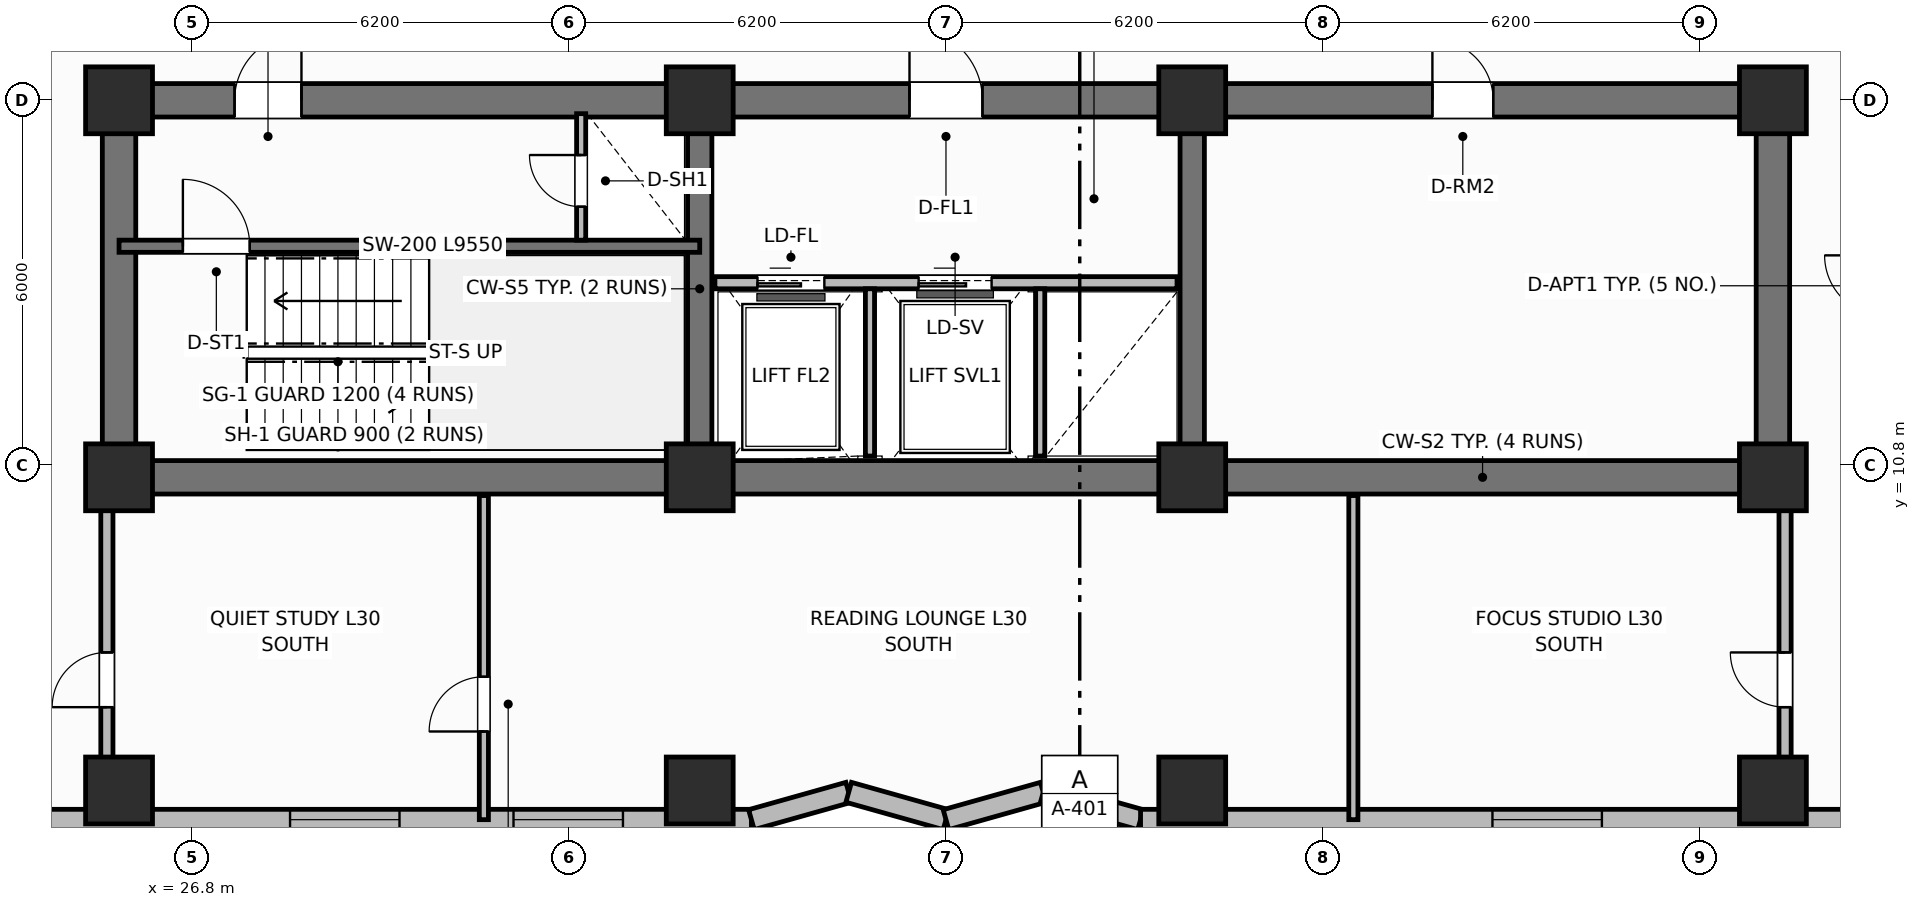
"""IFC4 building model, lengths in metres.
Left out: names, types, materials, properties, quantities, classifications, styles, units other than length and angle.
Written with IfcOpenShell. Run it as: python <this file> out.ifc"""

import sys

from ifc_helpers import new_model, si_unit, direction, frame, frame_2d, origin, origin_2d, place, context, subcontext, project, spatial, rectangle, extrude, element, fill, save


model = new_model("IFC4")
c1 = context("Model", 3, precision=1e-05, world=origin(), true_north=direction((0.0, 1.0)))
c2 = subcontext(c1, "Body", "Model", "MODEL_VIEW")
j1 = project(units=[si_unit("LENGTHUNIT", "METRE"), si_unit("PLANEANGLEUNIT", "RADIAN")], contexts=[c1])
p1 = place(None, origin())
s1 = spatial("IfcSite", under=j1, at=p1, CompositionType="ELEMENT")
p2 = place(p1, origin())
s2 = spatial("IfcBuilding", under=s1, at=p2, CompositionType="ELEMENT")
p3 = place(p2, frame((0.0, 0.0, 121.6)))
s3 = spatial("IfcBuildingStorey", under=s2, at=p3, CompositionType="ELEMENT", Elevation=121.6)
p4 = place(p3, frame((52.8, 10.6, 0.0), z_axis=(0.0, 0.0, 1.0), x_axis=(-1.0, 0.0, 0.0)))
e1 = element("IfcWall", 1, at=p4, inside=s3, PredefinedType="SHEAR", context=c2, shape_type="SweptSolid", body=[
    extrude(rectangle(XDim=27.2, YDim=0.55, at=frame_2d((13.6, 0.0))), origin(), (0.0, 0.0, 1.0), 3.7),
])
for number, where, z_axis, x_axis in (
    (2, (25.6, 10.875, 0.0), (0.0, 0.0, 1.0), (0.0, 1.0, 0.0)),
    (3, (52.8, 10.875, 0.0), (0.0, 0.0, 1.0), (0.0, 1.0, 0.0)),
):
    element("IfcWall", number, at=place(p3, frame(where, z_axis=z_axis, x_axis=x_axis)), inside=s3, PredefinedType="SHEAR", context=c2, shape_type="SweptSolid", body=[
        extrude(rectangle(XDim=5.65, YDim=0.55, at=frame_2d((2.825, 0.0))), origin(), (0.0, 0.0, 1.0), 3.7),
    ])
p5 = place(p3, frame((25.6, 16.8, 0.0), z_axis=(0.0, 0.0, 1.0), x_axis=(1.0, 0.0, 0.0)))
e4 = element("IfcWall", 4, at=p5, inside=s3, PredefinedType="SHEAR", context=c2, shape_type="SweptSolid", body=[
    extrude(rectangle(XDim=27.2, YDim=0.55, at=frame_2d((13.6, 0.0))), origin(), (0.0, 0.0, 1.0), 3.7),
])
p6 = place(p5, frame((1.9, 0.0, 0.0)))
e5 = element("IfcOpeningElement", 5, at=p6, cuts=e4, PredefinedType="OPENING", context=c2, shape_type="SweptSolid", body=[
    extrude(rectangle(XDim=1.1, YDim=2.15, at=frame_2d((0.55, 1.075))), frame((0.0, 0.285, 0.0), z_axis=(0.0, -1.0, 0.0), x_axis=(1.0, 0.0, 0.0)), (0.0, 0.0, 1.0), 0.57),
])
p7 = place(p5, frame((13.0, 0.0, 0.0)))
e6 = element("IfcOpeningElement", 6, at=p7, cuts=e4, PredefinedType="OPENING", context=c2, shape_type="SweptSolid", body=[
    extrude(rectangle(XDim=1.2, YDim=2.15, at=frame_2d((0.6, 1.075))), frame((0.0, 0.285, 0.0), z_axis=(0.0, -1.0, 0.0), x_axis=(1.0, 0.0, 0.0)), (0.0, 0.0, 1.0), 0.57),
])
p8 = place(p5, frame((21.6, 0.0, 0.0)))
e7 = element("IfcOpeningElement", 7, at=p8, cuts=e4, PredefinedType="OPENING", context=c2, shape_type="SweptSolid", body=[
    extrude(rectangle(XDim=1.0, YDim=2.15, at=frame_2d((0.5, 1.075))), frame((0.0, 0.285, 0.0), z_axis=(0.0, -1.0, 0.0), x_axis=(1.0, 0.0, 0.0)), (0.0, 0.0, 1.0), 0.57),
])
for number, where, z_axis, x_axis in (
    (8, (35.15, 10.875, 0.0), (0.0, 0.0, 1.0), (0.0, 1.0, 0.0)),
    (9, (43.25, 10.875, 0.0), (0.0, 0.0, 1.0), (0.0, 1.0, 0.0)),
):
    element("IfcWall", number, at=place(p3, frame(where, z_axis=z_axis, x_axis=x_axis)), inside=s3, PredefinedType="SHEAR", context=c2, shape_type="SweptSolid", body=[
        extrude(rectangle(XDim=5.65, YDim=0.4, at=frame_2d((2.825, 0.0))), origin(), (0.0, 0.0, 1.0), 3.7),
    ])
for number, where, z_axis, x_axis in (
    (10, (25.6, 10.6, 0.0), (0.0, 0.0, 1.0), (1.0, 0.0, 0.0)),
    (11, (25.6, 16.8, 0.0), (0.0, 0.0, 1.0), (1.0, 0.0, 0.0)),
    (12, (35.15, 10.6, 0.0), (0.0, 0.0, 1.0), (1.0, 0.0, 0.0)),
    (13, (35.15, 16.8, 0.0), (0.0, 0.0, 1.0), (1.0, 0.0, 0.0)),
    (14, (43.25, 10.6, 0.0), (0.0, 0.0, 1.0), (1.0, 0.0, 0.0)),
    (15, (43.25, 16.8, 0.0), (0.0, 0.0, 1.0), (1.0, 0.0, 0.0)),
    (16, (52.8, 10.6, 0.0), (0.0, 0.0, 1.0), (1.0, 0.0, 0.0)),
    (17, (52.8, 16.8, 0.0), (0.0, 0.0, 1.0), (1.0, 0.0, 0.0)),
    (18, (25.6, 5.45, 0.0), (0.0, 0.0, 1.0), (1.0, 0.0, 0.0)),
    (19, (35.15, 5.45, 0.0), (0.0, 0.0, 1.0), (1.0, 0.0, 0.0)),
    (20, (43.25, 5.45, 0.0), (0.0, 0.0, 1.0), (1.0, 0.0, 0.0)),
    (21, (52.8, 5.45, 0.0), (0.0, 0.0, 1.0), (1.0, 0.0, 0.0)),
):
    element("IfcColumn", number, at=place(p3, frame(where, z_axis=z_axis, x_axis=x_axis)), inside=s3, PredefinedType="COLUMN", context=c2, shape_type="SweptSolid", body=[
        extrude(rectangle(XDim=1.1, YDim=1.1, at=origin_2d()), origin(), (0.0, 0.0, 1.0), 3.7),
    ])
p9 = place(p3, frame((18.6, 4.97, 0.0), z_axis=(0.0, 0.0, 1.0), x_axis=(1.0, 0.0, 0.0)))
e22 = element("IfcWall", 22, at=p9, inside=s3, PredefinedType="SOLIDWALL", context=c2, shape_type="SweptSolid", body=[
    extrude(rectangle(XDim=17.4, YDim=0.34, at=frame_2d((8.7, 0.0))), origin(), (0.0, 0.0, 1.0), 2.7),
])
p10 = place(p9, frame((1.762, 0.0, 0.73)))
e23 = element("IfcOpeningElement", 23, at=p10, cuts=e22, PredefinedType="OPENING", context=c2, shape_type="SweptSolid", body=[
    extrude(rectangle(XDim=1.8, YDim=1.85, at=frame_2d((0.9, 0.925))), frame((0.0, 0.18, 0.0), z_axis=(0.0, -1.0, 0.0), x_axis=(1.0, 0.0, 0.0)), (0.0, 0.0, 1.0), 0.36),
])
p11 = place(p9, frame((9.812, 0.0, 0.73)))
e24 = element("IfcOpeningElement", 24, at=p11, cuts=e22, PredefinedType="OPENING", context=c2, shape_type="SweptSolid", body=[
    extrude(rectangle(XDim=1.8, YDim=1.85, at=frame_2d((0.9, 0.925))), frame((0.0, 0.18, 0.0), z_axis=(0.0, -1.0, 0.0), x_axis=(1.0, 0.0, 0.0)), (0.0, 0.0, 1.0), 0.36),
])
p12 = place(p9, frame((13.488, 0.0, 0.73)))
e25 = element("IfcOpeningElement", 25, at=p12, cuts=e22, PredefinedType="OPENING", context=c2, shape_type="SweptSolid", body=[
    extrude(rectangle(XDim=1.8, YDim=1.85, at=frame_2d((0.9, 0.925))), frame((0.0, 0.18, 0.0), z_axis=(0.0, -1.0, 0.0), x_axis=(1.0, 0.0, 0.0)), (0.0, 0.0, 1.0), 0.36),
])
p13 = place(p3, frame((36.0, 4.97, 0.0), z_axis=(0.0, 0.0, 1.0), x_axis=(0.962662902433, 0.270703040766, 0.0)))
e26 = element("IfcWall", 26, at=p13, inside=s3, PredefinedType="SOLIDWALL", context=c2, shape_type="SweptSolid", body=[
    extrude(rectangle(XDim=1.662, YDim=0.34, at=frame_2d((0.831, 0.0))), origin(), (0.0, 0.0, 1.0), 2.7),
])
p14 = place(p3, frame((37.6, 5.42, 0.0), z_axis=(0.0, 0.0, 1.0), x_axis=(0.962652136636, -0.270741322725, 0.0)))
e27 = element("IfcWall", 27, at=p14, inside=s3, PredefinedType="SOLIDWALL", context=c2, shape_type="SweptSolid", body=[
    extrude(rectangle(XDim=1.662, YDim=0.34, at=frame_2d((0.831, 0.0))), origin(), (0.0, 0.0, 1.0), 2.7),
])
p15 = place(p3, frame((39.2, 4.97, 0.0), z_axis=(0.0, 0.0, 1.0), x_axis=(0.962662902433, 0.270703040766, 0.0)))
e28 = element("IfcWall", 28, at=p15, inside=s3, PredefinedType="SOLIDWALL", context=c2, shape_type="SweptSolid", body=[
    extrude(rectangle(XDim=1.662, YDim=0.34, at=frame_2d((0.831, 0.0))), origin(), (0.0, 0.0, 1.0), 2.7),
])
p16 = place(p3, frame((40.8, 5.42, 0.0), z_axis=(0.0, 0.0, 1.0), x_axis=(0.962652136636, -0.270741322725, 0.0)))
e29 = element("IfcWall", 29, at=p16, inside=s3, PredefinedType="SOLIDWALL", context=c2, shape_type="SweptSolid", body=[
    extrude(rectangle(XDim=1.662, YDim=0.34, at=frame_2d((0.831, 0.0))), origin(), (0.0, 0.0, 1.0), 2.7),
])
p17 = place(p3, frame((42.4, 4.97, 0.0), z_axis=(0.0, 0.0, 1.0), x_axis=(1.0, 0.0, 0.0)))
e30 = element("IfcWall", 30, at=p17, inside=s3, PredefinedType="SOLIDWALL", context=c2, shape_type="SweptSolid", body=[
    extrude(rectangle(XDim=17.4, YDim=0.34, at=frame_2d((8.7, 0.0))), origin(), (0.0, 0.0, 1.0), 2.7),
])
p18 = place(p17, frame((5.788, 0.0, 0.73)))
e31 = element("IfcOpeningElement", 31, at=p18, cuts=e30, PredefinedType="OPENING", context=c2, shape_type="SweptSolid", body=[
    extrude(rectangle(XDim=1.8, YDim=1.85, at=frame_2d((0.9, 0.925))), frame((0.0, 0.18, 0.0), z_axis=(0.0, -1.0, 0.0), x_axis=(1.0, 0.0, 0.0)), (0.0, 0.0, 1.0), 0.36),
])
p19 = place(p17, frame((13.837, 0.0, 0.73)))
e32 = element("IfcOpeningElement", 32, at=p19, cuts=e30, PredefinedType="OPENING", context=c2, shape_type="SweptSolid", body=[
    extrude(rectangle(XDim=1.8, YDim=1.85, at=frame_2d((0.9, 0.925))), frame((0.0, 0.18, 0.0), z_axis=(0.0, -1.0, 0.0), x_axis=(1.0, 0.0, 0.0)), (0.0, 0.0, 1.0), 0.36),
])
p20 = place(p3, frame((25.6, 14.4, 0.0), z_axis=(0.0, 0.0, 1.0), x_axis=(1.0, 0.0, 0.0)))
e33 = element("IfcWall", 33, at=p20, inside=s3, PredefinedType="SHEAR", context=c2, shape_type="SweptSolid", body=[
    extrude(rectangle(XDim=9.55, YDim=0.2, at=frame_2d((4.775, 0.0))), origin(), (0.0, 0.0, 1.0), 3.7),
])
p21 = place(p20, frame((1.05, 0.0, 0.0)))
e34 = element("IfcOpeningElement", 34, at=p21, cuts=e33, PredefinedType="OPENING", context=c2, shape_type="SweptSolid", body=[
    extrude(rectangle(XDim=1.1, YDim=2.15, at=frame_2d((0.55, 1.075))), frame((0.0, 0.11, 0.0), z_axis=(0.0, -1.0, 0.0), x_axis=(1.0, 0.0, 0.0)), (0.0, 0.0, 1.0), 0.22),
])
p22 = place(p3, frame((33.2, 14.5, 0.0), z_axis=(0.0, 0.0, 1.0), x_axis=(0.0, 1.0, 0.0)))
e35 = element("IfcWall", 35, at=p22, inside=s3, PredefinedType="PARTITIONING", context=c2, shape_type="SweptSolid", body=[
    extrude(rectangle(XDim=2.08, YDim=0.15, at=frame_2d((1.04, 0.0))), origin(), (0.0, 0.0, 1.0), 2.53),
])
p23 = place(p22, frame((0.55, 0.0, 0.0)))
e36 = element("IfcOpeningElement", 36, at=p23, cuts=e35, PredefinedType="OPENING", context=c2, shape_type="SweptSolid", body=[
    extrude(rectangle(XDim=0.85, YDim=2.05, at=frame_2d((0.425, 1.025))), frame((0.0, 0.085, 0.0), z_axis=(0.0, -1.0, 0.0), x_axis=(1.0, 0.0, 0.0)), (0.0, 0.0, 1.0), 0.17),
])
p24 = place(p3, frame((35.4, 13.8, 0.0), z_axis=(0.0, 0.0, 1.0), x_axis=(1.0, 0.0, 0.0)))
e37 = element("IfcWall", 37, at=p24, inside=s3, PredefinedType="PARTITIONING", context=c2, shape_type="SweptSolid", body=[
    extrude(rectangle(XDim=7.6, YDim=0.2, at=frame_2d((3.8, 0.0))), origin(), (0.0, 0.0, 1.0), 2.3),
])
p25 = place(p24, frame((0.7, 0.0, 0.0)))
e38 = element("IfcOpeningElement", 38, at=p25, cuts=e37, PredefinedType="OPENING", context=c2, shape_type="SweptSolid", body=[
    extrude(rectangle(XDim=1.1, YDim=2.15, at=frame_2d((0.55, 1.075))), frame((0.0, 0.11, 0.0), z_axis=(0.0, -1.0, 0.0), x_axis=(1.0, 0.0, 0.0)), (0.0, 0.0, 1.0), 0.22),
])
p26 = place(p24, frame((3.35, 0.0, 0.0)))
e39 = element("IfcOpeningElement", 39, at=p26, cuts=e37, PredefinedType="OPENING", context=c2, shape_type="SweptSolid", body=[
    extrude(rectangle(XDim=1.2, YDim=2.15, at=frame_2d((0.6, 1.075))), frame((0.0, 0.11, 0.0), z_axis=(0.0, -1.0, 0.0), x_axis=(1.0, 0.0, 0.0)), (0.0, 0.0, 1.0), 0.22),
])
for number, where, z_axis, x_axis in (
    (40, (37.95, 10.95, 0.0), (0.0, 0.0, 1.0), (0.0, 1.0, 0.0)),
    (41, (40.75, 10.95, 0.0), (0.0, 0.0, 1.0), (0.0, 1.0, 0.0)),
):
    element("IfcWall", number, at=place(p3, frame(where, z_axis=z_axis, x_axis=x_axis)), inside=s3, PredefinedType="PARTITIONING", context=c2, shape_type="SweptSolid", body=[
        extrude(rectangle(XDim=2.75, YDim=0.15, at=frame_2d((1.375, 0.0))), origin(), (0.0, 0.0, 1.0), 2.53),
    ])
p27 = place(p3, frame((31.6, 4.97, 0.0), z_axis=(0.0, 0.0, 1.0), x_axis=(0.0, 1.0, 0.0)))
e42 = element("IfcWall", 42, at=p27, inside=s3, PredefinedType="PARTITIONING", context=c2, shape_type="SweptSolid", body=[
    extrude(rectangle(XDim=5.33, YDim=0.15, at=frame_2d((2.665, 0.0))), origin(), (0.0, 0.0, 1.0), 2.53),
])
p28 = place(p27, frame((1.45, 0.0, 0.0)))
e43 = element("IfcOpeningElement", 43, at=p28, cuts=e42, PredefinedType="OPENING", context=c2, shape_type="SweptSolid", body=[
    extrude(rectangle(XDim=0.9, YDim=2.1, at=frame_2d((0.45, 1.05))), frame((0.0, 0.085, 0.0), z_axis=(0.0, -1.0, 0.0), x_axis=(1.0, 0.0, 0.0)), (0.0, 0.0, 1.0), 0.17),
])
p29 = place(p3, frame((45.9, 4.97, 0.0), z_axis=(0.0, 0.0, 1.0), x_axis=(0.0, 1.0, 0.0)))
e44 = element("IfcWall", 44, at=p29, inside=s3, PredefinedType="PARTITIONING", context=c2, shape_type="SweptSolid", body=[
    extrude(rectangle(XDim=5.33, YDim=0.15, at=frame_2d((2.665, 0.0))), origin(), (0.0, 0.0, 1.0), 2.53),
])
p30 = place(p3, frame((25.4, 5.77, 0.0), z_axis=(0.0, 0.0, 1.0), x_axis=(0.0, 1.0, 0.0)))
e45 = element("IfcWall", 45, at=p30, inside=s3, PredefinedType="PARTITIONING", context=c2, shape_type="SweptSolid", body=[
    extrude(rectangle(XDim=4.53, YDim=0.2, at=frame_2d((2.265, 0.0))), origin(), (0.0, 0.0, 1.0), 2.53),
])
p31 = place(p30, frame((1.05, 0.0, 0.0)))
e46 = element("IfcOpeningElement", 46, at=p31, cuts=e45, PredefinedType="OPENING", context=c2, shape_type="SweptSolid", body=[
    extrude(rectangle(XDim=0.9, YDim=2.1, at=frame_2d((0.45, 1.05))), frame((0.0, 0.11, 0.0), z_axis=(0.0, -1.0, 0.0), x_axis=(1.0, 0.0, 0.0)), (0.0, 0.0, 1.0), 0.22),
])
p32 = place(p3, frame((53.0, 5.77, 0.0), z_axis=(0.0, 0.0, 1.0), x_axis=(0.0, 1.0, 0.0)))
e47 = element("IfcWall", 47, at=p32, inside=s3, PredefinedType="PARTITIONING", context=c2, shape_type="SweptSolid", body=[
    extrude(rectangle(XDim=4.53, YDim=0.2, at=frame_2d((2.265, 0.0))), origin(), (0.0, 0.0, 1.0), 2.53),
])
p33 = place(p32, frame((1.05, 0.0, 0.0)))
e48 = element("IfcOpeningElement", 48, at=p33, cuts=e47, PredefinedType="OPENING", context=c2, shape_type="SweptSolid", body=[
    extrude(rectangle(XDim=0.9, YDim=2.1, at=frame_2d((0.45, 1.05))), frame((0.0, 0.11, 0.0), z_axis=(0.0, -1.0, 0.0), x_axis=(1.0, 0.0, 0.0)), (0.0, 0.0, 1.0), 0.22),
])
p34 = place(p11, origin())
e49 = element("IfcWindow", 49, at=p34, inside=s3, PartitioningType="SINGLE_PANEL", PredefinedType="WINDOW", context=c2, shape_type="SweptSolid", body=[
    extrude(rectangle(XDim=1.8, YDim=1.85, at=frame_2d((0.9, 0.925))), frame((0.0, 0.03, 0.0), z_axis=(0.0, -1.0, 0.0), x_axis=(1.0, 0.0, 0.0)), (0.0, 0.0, 1.0), 0.06),
])
fill(e24, e49)
p35 = place(p12, origin())
e50 = element("IfcWindow", 50, at=p35, inside=s3, PartitioningType="SINGLE_PANEL", PredefinedType="WINDOW", context=c2, shape_type="SweptSolid", body=[
    extrude(rectangle(XDim=1.8, YDim=1.85, at=frame_2d((0.9, 0.925))), frame((0.0, 0.03, 0.0), z_axis=(0.0, -1.0, 0.0), x_axis=(1.0, 0.0, 0.0)), (0.0, 0.0, 1.0), 0.06),
])
fill(e25, e50)
p36 = place(p18, origin())
e51 = element("IfcWindow", 51, at=p36, inside=s3, PartitioningType="SINGLE_PANEL", PredefinedType="WINDOW", context=c2, shape_type="SweptSolid", body=[
    extrude(rectangle(XDim=1.8, YDim=1.85, at=frame_2d((0.9, 0.925))), frame((0.0, 0.03, 0.0), z_axis=(0.0, -1.0, 0.0), x_axis=(1.0, 0.0, 0.0)), (0.0, 0.0, 1.0), 0.06),
])
fill(e31, e51)
p37 = place(p21, origin())
e52 = element("IfcDoor", 52, at=p37, inside=s3, OperationType="SINGLE_SWING_LEFT", PredefinedType="DOOR", context=c2, shape_type="SweptSolid", body=[
    extrude(rectangle(XDim=1.1, YDim=2.15, at=frame_2d((0.55, 1.075))), frame((0.0, 0.025, 0.0), z_axis=(0.0, -1.0, 0.0), x_axis=(1.0, 0.0, 0.0)), (0.0, 0.0, 1.0), 0.05),
])
fill(e34, e52)
p38 = place(p23, origin())
e53 = element("IfcDoor", 53, at=p38, inside=s3, OperationType="SINGLE_SWING_RIGHT", PredefinedType="TRAPDOOR", context=c2, shape_type="SweptSolid", body=[
    extrude(rectangle(XDim=0.85, YDim=2.05, at=frame_2d((0.425, 1.025))), frame((0.0, 0.025, 0.0), z_axis=(0.0, -1.0, 0.0), x_axis=(1.0, 0.0, 0.0)), (0.0, 0.0, 1.0), 0.05),
])
fill(e36, e53)
p39 = place(p25, origin())
e54 = element("IfcDoor", 54, at=p39, inside=s3, OperationType="SLIDING_TO_LEFT", PredefinedType="DOOR", context=c2, shape_type="SweptSolid", body=[
    extrude(rectangle(XDim=1.1, YDim=2.15, at=frame_2d((0.55, 1.075))), frame((0.0, 0.025, 0.0), z_axis=(0.0, -1.0, 0.0), x_axis=(1.0, 0.0, 0.0)), (0.0, 0.0, 1.0), 0.05),
])
fill(e38, e54)
p40 = place(p26, origin())
e55 = element("IfcDoor", 55, at=p40, inside=s3, OperationType="SLIDING_TO_LEFT", PredefinedType="DOOR", context=c2, shape_type="SweptSolid", body=[
    extrude(rectangle(XDim=1.2, YDim=2.15, at=frame_2d((0.6, 1.075))), frame((0.0, 0.025, 0.0), z_axis=(0.0, -1.0, 0.0), x_axis=(1.0, 0.0, 0.0)), (0.0, 0.0, 1.0), 0.05),
])
fill(e39, e55)
p41 = place(p28, origin())
e56 = element("IfcDoor", 56, at=p41, inside=s3, OperationType="SINGLE_SWING_LEFT", PredefinedType="DOOR", context=c2, shape_type="SweptSolid", body=[
    extrude(rectangle(XDim=0.9, YDim=2.1, at=frame_2d((0.45, 1.05))), frame((0.0, 0.025, 0.0), z_axis=(0.0, -1.0, 0.0), x_axis=(1.0, 0.0, 0.0)), (0.0, 0.0, 1.0), 0.05),
])
fill(e43, e56)
p42 = place(p31, origin())
e57 = element("IfcDoor", 57, at=p42, inside=s3, OperationType="SINGLE_SWING_LEFT", PredefinedType="DOOR", context=c2, shape_type="SweptSolid", body=[
    extrude(rectangle(XDim=0.9, YDim=2.1, at=frame_2d((0.45, 1.05))), frame((0.0, 0.025, 0.0), z_axis=(0.0, -1.0, 0.0), x_axis=(1.0, 0.0, 0.0)), (0.0, 0.0, 1.0), 0.05),
])
fill(e46, e57)
p43 = place(p33, origin())
e58 = element("IfcDoor", 58, at=p43, inside=s3, OperationType="SINGLE_SWING_RIGHT", PredefinedType="DOOR", context=c2, shape_type="SweptSolid", body=[
    extrude(rectangle(XDim=0.9, YDim=2.1, at=frame_2d((0.45, 1.05))), frame((0.0, 0.025, 0.0), z_axis=(0.0, -1.0, 0.0), x_axis=(1.0, 0.0, 0.0)), (0.0, 0.0, 1.0), 0.05),
])
fill(e48, e58)
p44 = place(p6, origin())
e59 = element("IfcDoor", 59, at=p44, inside=s3, OperationType="SINGLE_SWING_RIGHT", PredefinedType="DOOR", context=c2, shape_type="SweptSolid", body=[
    extrude(rectangle(XDim=1.1, YDim=2.15, at=frame_2d((0.55, 1.075))), frame((0.0, 0.025, 0.0), z_axis=(0.0, -1.0, 0.0), x_axis=(1.0, 0.0, 0.0)), (0.0, 0.0, 1.0), 0.05),
])
fill(e5, e59)
p45 = place(p7, origin())
e60 = element("IfcDoor", 60, at=p45, inside=s3, OperationType="SINGLE_SWING_LEFT", PredefinedType="DOOR", context=c2, shape_type="SweptSolid", body=[
    extrude(rectangle(XDim=1.2, YDim=2.15, at=frame_2d((0.6, 1.075))), frame((0.0, 0.025, 0.0), z_axis=(0.0, -1.0, 0.0), x_axis=(1.0, 0.0, 0.0)), (0.0, 0.0, 1.0), 0.05),
])
fill(e6, e60)
p46 = place(p8, origin())
e61 = element("IfcDoor", 61, at=p46, inside=s3, OperationType="SINGLE_SWING_LEFT", PredefinedType="DOOR", context=c2, shape_type="SweptSolid", body=[
    extrude(rectangle(XDim=1.0, YDim=2.15, at=frame_2d((0.5, 1.075))), frame((0.0, 0.025, 0.0), z_axis=(0.0, -1.0, 0.0), x_axis=(1.0, 0.0, 0.0)), (0.0, 0.0, 1.0), 0.05),
])
fill(e7, e61)
save(model, sys.argv[1])
